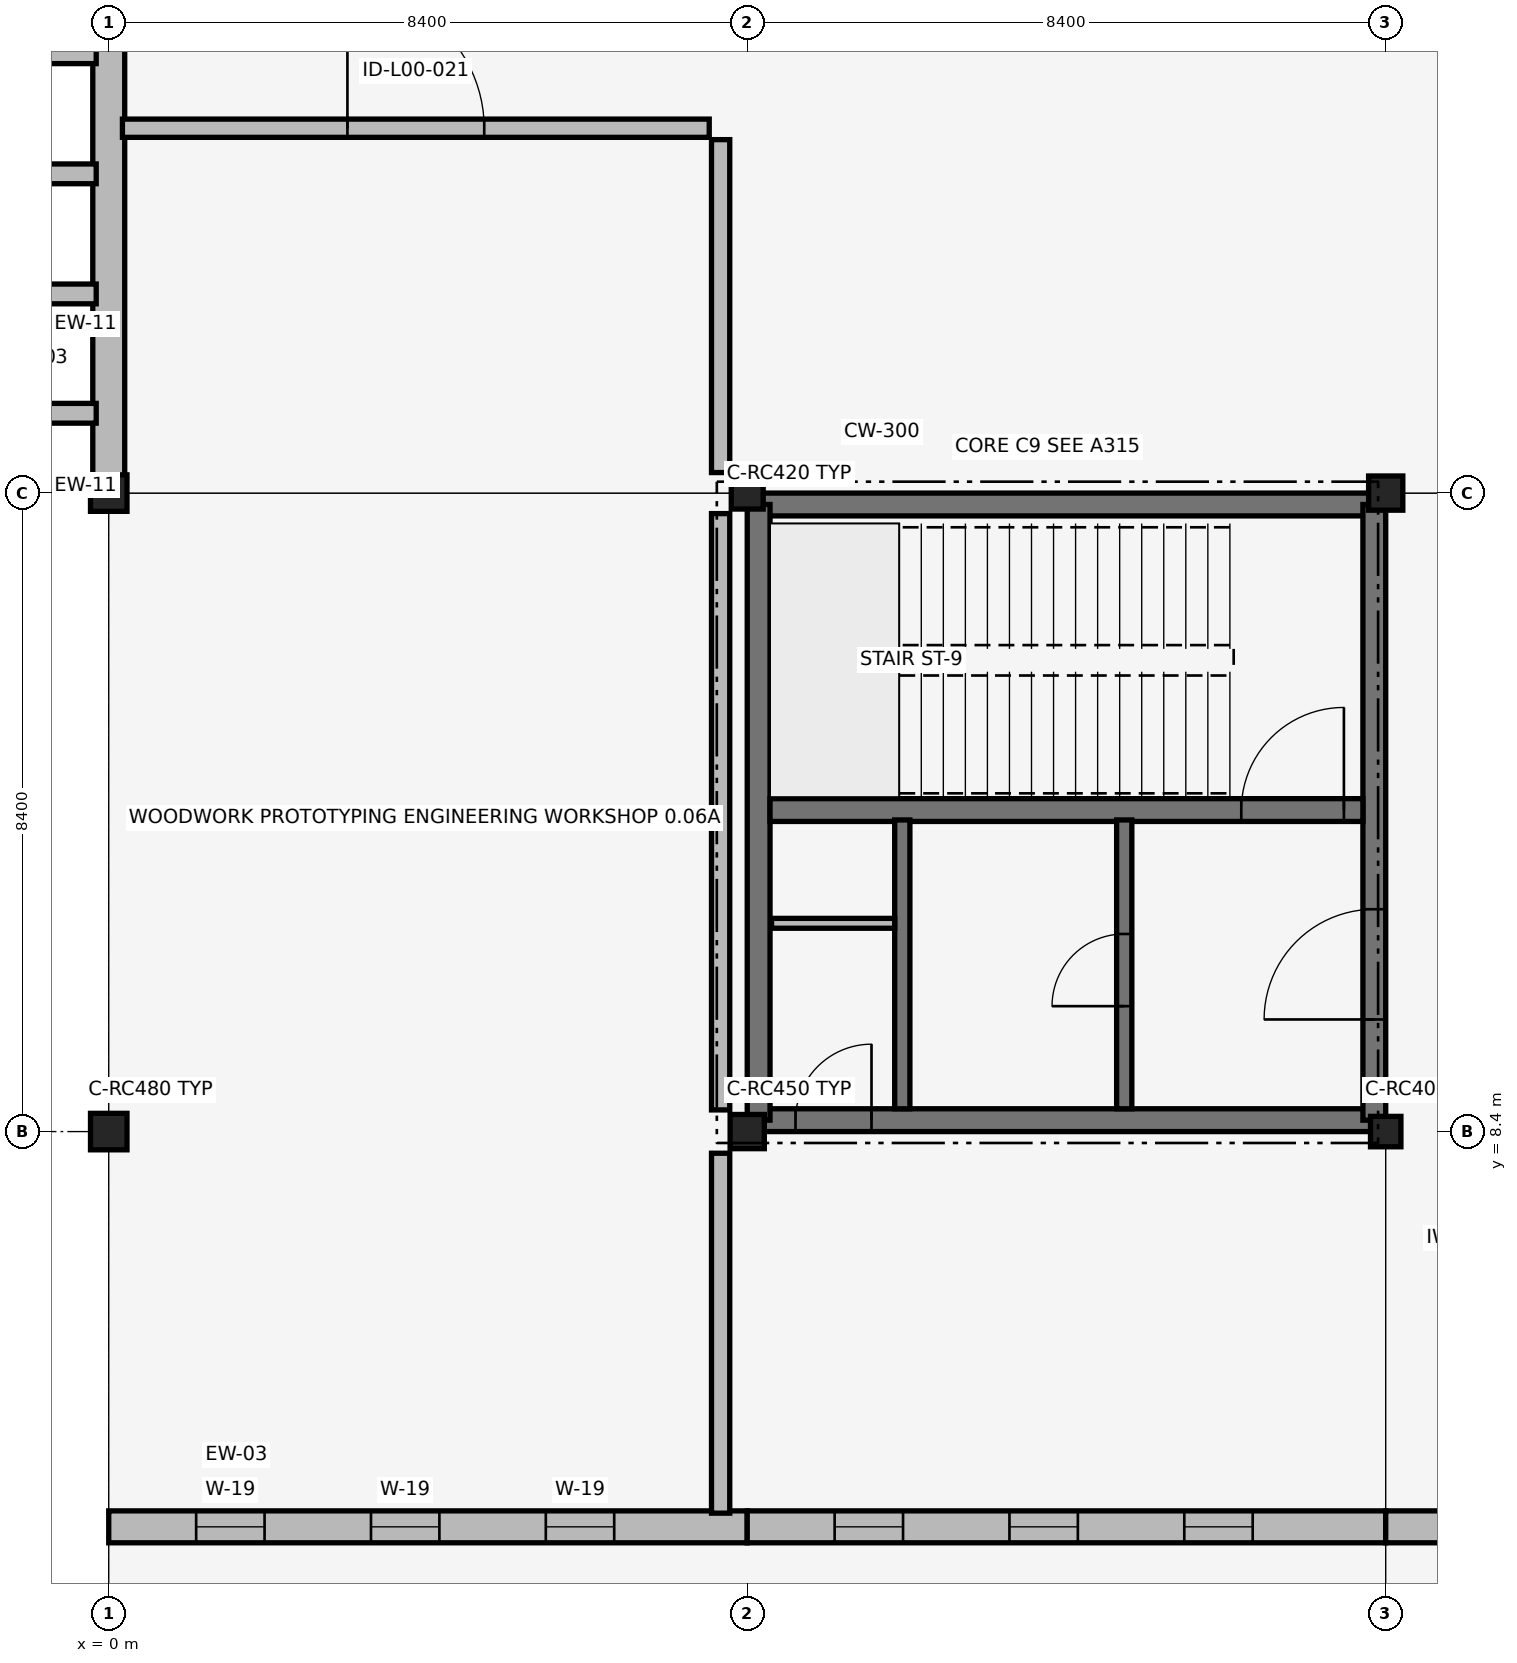
"""IFC4 building model, lengths in metres.
Left out: names, types, materials, properties, quantities, classifications, styles, units other than length and angle.
Written with IfcOpenShell. Run it as: python <this file> out.ifc"""

import sys

from ifc_helpers import new_model, si_unit, direction, frame, frame_2d, origin, origin_2d, place, context, subcontext, project, spatial, rectangle, extrude, element, fill, save


model = new_model("IFC4")
c1 = context("Model", 3, precision=1e-05, world=origin(), true_north=direction((0.0, 1.0)))
c2 = subcontext(c1, "Body", "Model", "MODEL_VIEW")
j1 = project(units=[si_unit("LENGTHUNIT", "METRE"), si_unit("PLANEANGLEUNIT", "RADIAN")], contexts=[c1])
p1 = place(None, origin())
s1 = spatial("IfcSite", under=j1, at=p1, CompositionType="ELEMENT")
p2 = place(p1, origin())
s2 = spatial("IfcBuilding", under=s1, at=p2, CompositionType="ELEMENT")
p3 = place(p2, origin())
s3 = spatial("IfcBuildingStorey", under=s2, at=p3, CompositionType="ELEMENT", Elevation=0.0)
p4 = place(p3, frame((8.55, 8.55, 0.0), z_axis=(0.0, 0.0, 1.0), x_axis=(1.0, 0.0, 0.0)))
e1 = element("IfcWall", 1, at=p4, inside=s3, PredefinedType="SHEAR", context=c2, shape_type="SweptSolid", body=[
    extrude(rectangle(XDim=8.1, YDim=0.3, at=frame_2d((4.05, 0.0))), origin(), (0.0, 0.0, 1.0), 5.14),
])
p5 = place(p4, frame((0.485, 0.0, 0.0)))
e2 = element("IfcOpeningElement", 2, at=p5, cuts=e1, PredefinedType="OPENING", context=c2, shape_type="SweptSolid", body=[
    extrude(rectangle(XDim=1.0, YDim=2.15, at=frame_2d((0.5, 1.075))), frame((0.0, 0.16, 0.0), z_axis=(0.0, -1.0, 0.0), x_axis=(1.0, 0.0, 0.0)), (0.0, 0.0, 1.0), 0.32),
])
for number, where, z_axis, x_axis in (
    (3, (8.55, 16.65, 0.0), (0.0, 0.0, 1.0), (1.0, 0.0, 0.0)),
    (4, (8.55, 8.55, 0.0), (0.0, 0.0, 1.0), (0.0, 1.0, 0.0)),
):
    element("IfcWall", number, at=place(p3, frame(where, z_axis=z_axis, x_axis=x_axis)), inside=s3, PredefinedType="SHEAR", context=c2, shape_type="SweptSolid", body=[
        extrude(rectangle(XDim=8.1, YDim=0.3, at=frame_2d((4.05, 0.0))), origin(), (0.0, 0.0, 1.0), 5.14),
    ])
p6 = place(p3, frame((16.65, 8.55, 0.0), z_axis=(0.0, 0.0, 1.0), x_axis=(0.0, 1.0, 0.0)))
e5 = element("IfcWall", 5, at=p6, inside=s3, PredefinedType="SHEAR", context=c2, shape_type="SweptSolid", body=[
    extrude(rectangle(XDim=8.1, YDim=0.3, at=frame_2d((4.05, 0.0))), origin(), (0.0, 0.0, 1.0), 5.14),
])
p7 = place(p6, frame((1.325, 0.0, 0.0)))
e6 = element("IfcOpeningElement", 6, at=p7, cuts=e5, PredefinedType="OPENING", context=c2, shape_type="SweptSolid", body=[
    extrude(rectangle(XDim=1.45, YDim=2.15, at=frame_2d((0.725, 1.075))), frame((0.0, 0.16, 0.0), z_axis=(0.0, -1.0, 0.0), x_axis=(1.0, 0.0, 0.0)), (0.0, 0.0, 1.0), 0.32),
])
p8 = place(p3, frame((8.7, 12.63, 0.0), z_axis=(0.0, 0.0, 1.0), x_axis=(1.0, 0.0, 0.0)))
e7 = element("IfcWall", 7, at=p8, inside=s3, PredefinedType="SHEAR", context=c2, shape_type="SweptSolid", body=[
    extrude(rectangle(XDim=7.8, YDim=0.3, at=frame_2d((3.9, 0.0))), origin(), (0.0, 0.0, 1.0), 5.14),
])
p9 = place(p8, frame((6.2, 0.0, 0.0)))
e8 = element("IfcOpeningElement", 8, at=p9, cuts=e7, PredefinedType="OPENING", context=c2, shape_type="SweptSolid", body=[
    extrude(rectangle(XDim=1.35, YDim=2.15, at=frame_2d((0.675, 1.075))), frame((0.0, 0.16, 0.0), z_axis=(0.0, -1.0, 0.0), x_axis=(1.0, 0.0, 0.0)), (0.0, 0.0, 1.0), 0.32),
])
for number, where, z_axis, x_axis in (
    (9, (0.0, 8.4, -0.32), (0.0, 0.0, 1.0), (1.0, 0.0, 0.0)),
    (10, (0.0, 16.8, -0.32), (0.0, 0.0, 1.0), (1.0, 0.0, 0.0)),
):
    element("IfcColumn", number, at=place(p3, frame(where, z_axis=z_axis, x_axis=x_axis)), inside=s3, PredefinedType="COLUMN", context=c2, shape_type="SweptSolid", body=[
        extrude(rectangle(XDim=0.48, YDim=0.48, at=origin_2d()), origin(), (0.0, 0.0, 1.0), 5.46),
    ])
p10 = place(p3, frame((8.4, 8.4, -0.32), z_axis=(0.0, 0.0, 1.0), x_axis=(1.0, 0.0, 0.0)))
e11 = element("IfcColumn", 11, at=p10, inside=s3, PredefinedType="COLUMN", context=c2, shape_type="SweptSolid", body=[
    extrude(rectangle(XDim=0.45, YDim=0.45, at=origin_2d()), origin(), (0.0, 0.0, 1.0), 5.46),
])
p11 = place(p3, frame((8.4, 16.8, -0.32), z_axis=(0.0, 0.0, 1.0), x_axis=(1.0, 0.0, 0.0)))
e12 = element("IfcColumn", 12, at=p11, inside=s3, PredefinedType="COLUMN", context=c2, shape_type="SweptSolid", body=[
    extrude(rectangle(XDim=0.42, YDim=0.42, at=origin_2d()), origin(), (0.0, 0.0, 1.0), 5.46),
])
p12 = place(p3, frame((16.8, 8.4, -0.32), z_axis=(0.0, 0.0, 1.0), x_axis=(1.0, 0.0, 0.0)))
e13 = element("IfcColumn", 13, at=p12, inside=s3, PredefinedType="COLUMN", context=c2, shape_type="SweptSolid", body=[
    extrude(rectangle(XDim=0.4, YDim=0.4, at=origin_2d()), origin(), (0.0, 0.0, 1.0), 5.46),
])
p13 = place(p3, frame((16.8, 16.8, -0.32), z_axis=(0.0, 0.0, 1.0), x_axis=(1.0, 0.0, 0.0)))
e14 = element("IfcColumn", 14, at=p13, inside=s3, PredefinedType="COLUMN", context=c2, shape_type="SweptSolid", body=[
    extrude(rectangle(XDim=0.45, YDim=0.45, at=origin_2d()), origin(), (0.0, 0.0, 1.0), 5.46),
])
p14 = place(p3, frame((0.0, 3.2, 0.0), z_axis=(0.0, 0.0, 1.0), x_axis=(1.0, 0.0, 0.0)))
e15 = element("IfcWall", 15, at=p14, inside=s3, PredefinedType="SOLIDWALL", context=c2, shape_type="SweptSolid", body=[
    extrude(rectangle(XDim=8.4, YDim=0.42, at=frame_2d((4.2, 0.0))), origin(), (0.0, 0.0, 1.0), 4.39),
])
p15 = place(p14, frame((1.15, 0.0, 0.85)))
e16 = element("IfcOpeningElement", 16, at=p15, cuts=e15, PredefinedType="OPENING", context=c2, shape_type="SweptSolid", body=[
    extrude(rectangle(XDim=0.9, YDim=3.0, at=frame_2d((0.45, 1.5))), frame((0.0, 0.22, 0.0), z_axis=(0.0, -1.0, 0.0), x_axis=(1.0, 0.0, 0.0)), (0.0, 0.0, 1.0), 0.44),
])
p16 = place(p14, frame((3.45, 0.0, 0.85)))
e17 = element("IfcOpeningElement", 17, at=p16, cuts=e15, PredefinedType="OPENING", context=c2, shape_type="SweptSolid", body=[
    extrude(rectangle(XDim=0.9, YDim=3.0, at=frame_2d((0.45, 1.5))), frame((0.0, 0.22, 0.0), z_axis=(0.0, -1.0, 0.0), x_axis=(1.0, 0.0, 0.0)), (0.0, 0.0, 1.0), 0.44),
])
p17 = place(p14, frame((5.75, 0.0, 0.85)))
e18 = element("IfcOpeningElement", 18, at=p17, cuts=e15, PredefinedType="OPENING", context=c2, shape_type="SweptSolid", body=[
    extrude(rectangle(XDim=0.9, YDim=3.0, at=frame_2d((0.45, 1.5))), frame((0.0, 0.22, 0.0), z_axis=(0.0, -1.0, 0.0), x_axis=(1.0, 0.0, 0.0)), (0.0, 0.0, 1.0), 0.44),
])
p18 = place(p3, frame((0.0, 17.025, 0.0), z_axis=(0.0, 0.0, 1.0), x_axis=(0.0, 1.0, 0.0)))
e19 = element("IfcWall", 19, at=p18, inside=s3, PredefinedType="SOLIDWALL", context=c2, shape_type="SweptSolid", body=[
    extrude(rectangle(XDim=7.74, YDim=0.42, at=frame_2d((3.87, 0.0))), origin(), (0.0, 0.0, 1.0), 4.39),
])
for number, where, z_axis, x_axis in (
    (20, (-0.165, 17.85, -0.25), (0.0, 0.0, 1.0), (-1.0, 0.0, 0.0)),
    (21, (-0.165, 19.42, -0.25), (0.0, 0.0, 1.0), (-1.0, 0.0, 0.0)),
    (22, (-0.165, 21.0, -0.25), (0.0, 0.0, 1.0), (-1.0, 0.0, 0.0)),
    (23, (-0.165, 22.58, -0.25), (0.0, 0.0, 1.0), (-1.0, 0.0, 0.0)),
):
    element("IfcWall", number, at=place(p3, frame(where, z_axis=z_axis, x_axis=x_axis)), inside=s3, PredefinedType="SOLIDWALL", context=c2, shape_type="SweptSolid", body=[
        extrude(rectangle(XDim=0.7, YDim=0.26, at=frame_2d((0.35, 0.0))), origin(), (0.0, 0.0, 1.0), 5.69),
    ])
p19 = place(p3, frame((8.4, 3.2, 0.0), z_axis=(0.0, 0.0, 1.0), x_axis=(1.0, 0.0, 0.0)))
e24 = element("IfcWall", 24, at=p19, inside=s3, PredefinedType="SOLIDWALL", context=c2, shape_type="SweptSolid", body=[
    extrude(rectangle(XDim=8.4, YDim=0.42, at=frame_2d((4.2, 0.0))), origin(), (0.0, 0.0, 1.0), 4.49),
])
p20 = place(p19, frame((1.15, 0.0, 0.85)))
e25 = element("IfcOpeningElement", 25, at=p20, cuts=e24, PredefinedType="OPENING", context=c2, shape_type="SweptSolid", body=[
    extrude(rectangle(XDim=0.9, YDim=3.0, at=frame_2d((0.45, 1.5))), frame((0.0, 0.22, 0.0), z_axis=(0.0, -1.0, 0.0), x_axis=(1.0, 0.0, 0.0)), (0.0, 0.0, 1.0), 0.44),
])
p21 = place(p19, frame((3.45, 0.0, 0.85)))
e26 = element("IfcOpeningElement", 26, at=p21, cuts=e24, PredefinedType="OPENING", context=c2, shape_type="SweptSolid", body=[
    extrude(rectangle(XDim=0.9, YDim=3.0, at=frame_2d((0.45, 1.5))), frame((0.0, 0.22, 0.0), z_axis=(0.0, -1.0, 0.0), x_axis=(1.0, 0.0, 0.0)), (0.0, 0.0, 1.0), 0.44),
])
p22 = place(p19, frame((5.75, 0.0, 0.85)))
e27 = element("IfcOpeningElement", 27, at=p22, cuts=e24, PredefinedType="OPENING", context=c2, shape_type="SweptSolid", body=[
    extrude(rectangle(XDim=0.9, YDim=3.0, at=frame_2d((0.45, 1.5))), frame((0.0, 0.22, 0.0), z_axis=(0.0, -1.0, 0.0), x_axis=(1.0, 0.0, 0.0)), (0.0, 0.0, 1.0), 0.44),
])
p23 = place(p3, frame((16.8, 3.2, 0.0), z_axis=(0.0, 0.0, 1.0), x_axis=(1.0, 0.0, 0.0)))
e28 = element("IfcWall", 28, at=p23, inside=s3, PredefinedType="SOLIDWALL", context=c2, shape_type="SweptSolid", body=[
    extrude(rectangle(XDim=8.4, YDim=0.42, at=frame_2d((4.2, 0.0))), origin(), (0.0, 0.0, 1.0), 4.49),
])
p24 = place(p23, frame((3.1, 0.0, 0.0)))
e29 = element("IfcOpeningElement", 29, at=p24, cuts=e28, PredefinedType="OPENING", context=c2, shape_type="SweptSolid", body=[
    extrude(rectangle(XDim=2.2, YDim=2.4, at=frame_2d((1.1, 1.2))), frame((0.0, 0.22, 0.0), z_axis=(0.0, -1.0, 0.0), x_axis=(1.0, 0.0, 0.0)), (0.0, 0.0, 1.0), 0.44),
])
p25 = place(p3, frame((13.36, 8.7, 0.0), z_axis=(0.0, 0.0, 1.0), x_axis=(0.0, 1.0, 0.0)))
e30 = element("IfcWall", 30, at=p25, inside=s3, PredefinedType="SHEAR", context=c2, shape_type="SweptSolid", body=[
    extrude(rectangle(XDim=3.8, YDim=0.2, at=frame_2d((1.9, 0.0))), origin(), (0.0, 0.0, 1.0), 4.46),
])
p26 = place(p25, frame((1.35, 0.0, 0.0)))
e31 = element("IfcOpeningElement", 31, at=p26, cuts=e30, PredefinedType="OPENING", context=c2, shape_type="SweptSolid", body=[
    extrude(rectangle(XDim=0.95, YDim=2.1, at=frame_2d((0.475, 1.05))), frame((0.0, 0.11, 0.0), z_axis=(0.0, -1.0, 0.0), x_axis=(1.0, 0.0, 0.0)), (0.0, 0.0, 1.0), 0.22),
])
p27 = place(p3, frame((10.44, 8.7, 0.0), z_axis=(0.0, 0.0, 1.0), x_axis=(0.0, 1.0, 0.0)))
e32 = element("IfcWall", 32, at=p27, inside=s3, PredefinedType="SHEAR", context=c2, shape_type="SweptSolid", body=[
    extrude(rectangle(XDim=3.8, YDim=0.2, at=frame_2d((1.9, 0.0))), origin(), (0.0, 0.0, 1.0), 4.46),
])
p28 = place(p3, frame((8.72, 11.14, 0.0), z_axis=(0.0, 0.0, 1.0), x_axis=(1.0, 0.0, 0.0)))
e33 = element("IfcWall", 33, at=p28, inside=s3, PredefinedType="PARTITIONING", context=c2, shape_type="SweptSolid", body=[
    extrude(rectangle(XDim=1.62, YDim=0.13, at=frame_2d((0.81, 0.0))), origin(), (0.0, 0.0, 1.0), 5.14),
])
p29 = place(p3, frame((0.18, 21.6, 0.0), z_axis=(0.0, 0.0, 1.0), x_axis=(1.0, 0.0, 0.0)))
e34 = element("IfcWall", 34, at=p29, inside=s3, PredefinedType="PARTITIONING", context=c2, shape_type="SweptSolid", body=[
    extrude(rectangle(XDim=7.72, YDim=0.24, at=frame_2d((3.86, 0.0))), origin(), (0.0, 0.0, 1.0), 4.39),
])
p30 = place(p29, frame((2.96, 0.0, 0.0)))
e35 = element("IfcOpeningElement", 35, at=p30, cuts=e34, PredefinedType="OPENING", context=c2, shape_type="SweptSolid", body=[
    extrude(rectangle(XDim=1.8, YDim=2.4, at=frame_2d((0.9, 1.2))), frame((0.0, 0.13, 0.0), z_axis=(0.0, -1.0, 0.0), x_axis=(1.0, 0.0, 0.0)), (0.0, 0.0, 1.0), 0.26),
])
p31 = place(p3, frame((8.05, 3.38, 0.0), z_axis=(0.0, 0.0, 1.0), x_axis=(0.0, 1.0, 0.0)))
e36 = element("IfcWall", 36, at=p31, inside=s3, PredefinedType="PARTITIONING", context=c2, shape_type="SweptSolid", body=[
    extrude(rectangle(XDim=4.735, YDim=0.24, at=frame_2d((2.368, 0.0))), origin(), (0.0, 0.0, 1.0), 4.46),
])
p32 = place(p3, frame((8.05, 8.685, 0.0), z_axis=(0.0, 0.0, 1.0), x_axis=(0.0, 1.0, 0.0)))
e37 = element("IfcWall", 37, at=p32, inside=s3, PredefinedType="PARTITIONING", context=c2, shape_type="SweptSolid", body=[
    extrude(rectangle(XDim=7.845, YDim=0.24, at=frame_2d((3.922, 0.0))), origin(), (0.0, 0.0, 1.0), 4.36),
])
p33 = place(p3, frame((8.05, 17.07, 0.0), z_axis=(0.0, 0.0, 1.0), x_axis=(0.0, 1.0, 0.0)))
e38 = element("IfcWall", 38, at=p33, inside=s3, PredefinedType="PARTITIONING", context=c2, shape_type="SweptSolid", body=[
    extrude(rectangle(XDim=4.38, YDim=0.24, at=frame_2d((2.19, 0.0))), origin(), (0.0, 0.0, 1.0), 4.36),
])
p34 = place(p15, origin())
e39 = element("IfcWindow", 39, at=p34, inside=s3, PartitioningType="DOUBLE_PANEL_VERTICAL", PredefinedType="WINDOW", context=c2, shape_type="SweptSolid", body=[
    extrude(rectangle(XDim=0.9, YDim=3.0, at=frame_2d((0.45, 1.5))), frame((0.0, 0.03, 0.0), z_axis=(0.0, -1.0, 0.0), x_axis=(1.0, 0.0, 0.0)), (0.0, 0.0, 1.0), 0.06),
])
fill(e16, e39)
p35 = place(p16, origin())
e40 = element("IfcWindow", 40, at=p35, inside=s3, PartitioningType="DOUBLE_PANEL_VERTICAL", PredefinedType="WINDOW", context=c2, shape_type="SweptSolid", body=[
    extrude(rectangle(XDim=0.9, YDim=3.0, at=frame_2d((0.45, 1.5))), frame((0.0, 0.03, 0.0), z_axis=(0.0, -1.0, 0.0), x_axis=(1.0, 0.0, 0.0)), (0.0, 0.0, 1.0), 0.06),
])
fill(e17, e40)
p36 = place(p17, origin())
e41 = element("IfcWindow", 41, at=p36, inside=s3, PartitioningType="DOUBLE_PANEL_VERTICAL", PredefinedType="WINDOW", context=c2, shape_type="SweptSolid", body=[
    extrude(rectangle(XDim=0.9, YDim=3.0, at=frame_2d((0.45, 1.5))), frame((0.0, 0.03, 0.0), z_axis=(0.0, -1.0, 0.0), x_axis=(1.0, 0.0, 0.0)), (0.0, 0.0, 1.0), 0.06),
])
fill(e18, e41)
p37 = place(p20, origin())
e42 = element("IfcWindow", 42, at=p37, inside=s3, PartitioningType="DOUBLE_PANEL_VERTICAL", PredefinedType="WINDOW", context=c2, shape_type="SweptSolid", body=[
    extrude(rectangle(XDim=0.9, YDim=3.0, at=frame_2d((0.45, 1.5))), frame((0.0, 0.03, 0.0), z_axis=(0.0, -1.0, 0.0), x_axis=(1.0, 0.0, 0.0)), (0.0, 0.0, 1.0), 0.06),
])
fill(e25, e42)
p38 = place(p21, origin())
e43 = element("IfcWindow", 43, at=p38, inside=s3, PartitioningType="DOUBLE_PANEL_VERTICAL", PredefinedType="WINDOW", context=c2, shape_type="SweptSolid", body=[
    extrude(rectangle(XDim=0.9, YDim=3.0, at=frame_2d((0.45, 1.5))), frame((0.0, 0.03, 0.0), z_axis=(0.0, -1.0, 0.0), x_axis=(1.0, 0.0, 0.0)), (0.0, 0.0, 1.0), 0.06),
])
fill(e26, e43)
p39 = place(p22, origin())
e44 = element("IfcWindow", 44, at=p39, inside=s3, PartitioningType="DOUBLE_PANEL_VERTICAL", PredefinedType="WINDOW", context=c2, shape_type="SweptSolid", body=[
    extrude(rectangle(XDim=0.9, YDim=3.0, at=frame_2d((0.45, 1.5))), frame((0.0, 0.03, 0.0), z_axis=(0.0, -1.0, 0.0), x_axis=(1.0, 0.0, 0.0)), (0.0, 0.0, 1.0), 0.06),
])
fill(e27, e44)
p40 = place(p9, origin())
e45 = element("IfcDoor", 45, at=p40, inside=s3, OperationType="SINGLE_SWING_RIGHT", PredefinedType="DOOR", context=c2, shape_type="SweptSolid", body=[
    extrude(rectangle(XDim=1.35, YDim=2.15, at=frame_2d((0.675, 1.075))), frame((0.0, 0.025, 0.0), z_axis=(0.0, -1.0, 0.0), x_axis=(1.0, 0.0, 0.0)), (0.0, 0.0, 1.0), 0.05),
])
fill(e8, e45)
p41 = place(p26, origin())
e46 = element("IfcDoor", 46, at=p41, inside=s3, OperationType="SINGLE_SWING_LEFT", PredefinedType="DOOR", context=c2, shape_type="SweptSolid", body=[
    extrude(rectangle(XDim=0.95, YDim=2.1, at=frame_2d((0.475, 1.05))), frame((0.0, 0.025, 0.0), z_axis=(0.0, -1.0, 0.0), x_axis=(1.0, 0.0, 0.0)), (0.0, 0.0, 1.0), 0.05),
])
fill(e31, e46)
p42 = place(p7, origin())
e47 = element("IfcDoor", 47, at=p42, inside=s3, OperationType="DOUBLE_DOOR_SINGLE_SWING", PredefinedType="DOOR", context=c2, shape_type="SweptSolid", body=[
    extrude(rectangle(XDim=1.45, YDim=2.15, at=frame_2d((0.725, 1.075))), frame((0.0, 0.025, 0.0), z_axis=(0.0, -1.0, 0.0), x_axis=(1.0, 0.0, 0.0)), (0.0, 0.0, 1.0), 0.05),
])
fill(e6, e47)
p43 = place(p5, origin())
e48 = element("IfcDoor", 48, at=p43, inside=s3, OperationType="SINGLE_SWING_RIGHT", PredefinedType="DOOR", context=c2, shape_type="SweptSolid", body=[
    extrude(rectangle(XDim=1.0, YDim=2.15, at=frame_2d((0.5, 1.075))), frame((0.0, 0.025, 0.0), z_axis=(0.0, -1.0, 0.0), x_axis=(1.0, 0.0, 0.0)), (0.0, 0.0, 1.0), 0.05),
])
fill(e2, e48)
p44 = place(p30, origin())
e49 = element("IfcDoor", 49, at=p44, inside=s3, OperationType="DOUBLE_DOOR_SINGLE_SWING", PredefinedType="DOOR", context=c2, shape_type="SweptSolid", body=[
    extrude(rectangle(XDim=1.8, YDim=2.4, at=frame_2d((0.9, 1.2))), frame((0.0, 0.025, 0.0), z_axis=(0.0, -1.0, 0.0), x_axis=(1.0, 0.0, 0.0)), (0.0, 0.0, 1.0), 0.05),
])
fill(e35, e49)
save(model, sys.argv[1])
